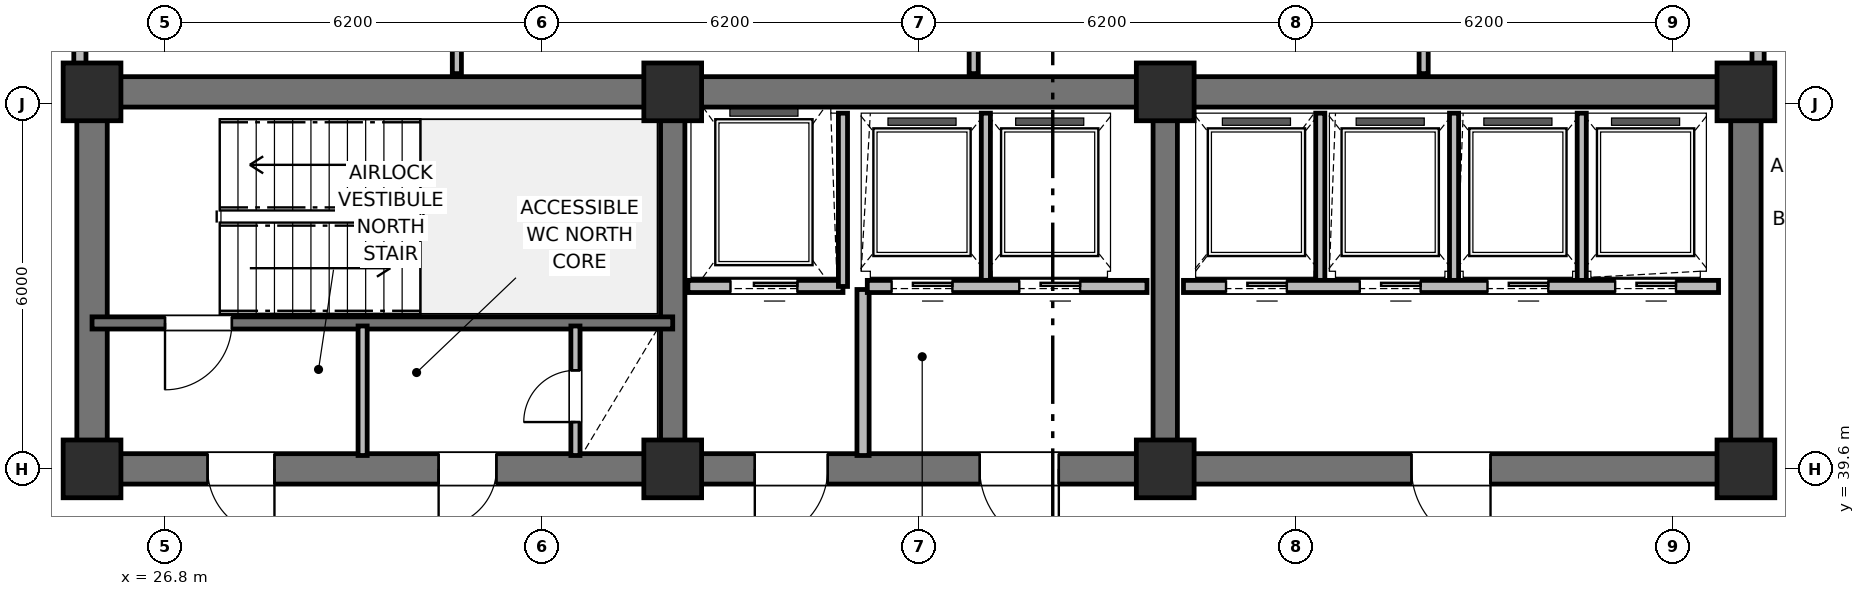
"""IFC4 building model, lengths in metres.
Left out: names, types, materials, properties, quantities, classifications, styles, units other than length and angle.
Written with IfcOpenShell. Run it as: python <this file> out.ifc"""

import sys

from ifc_helpers import new_model, si_unit, direction, frame, frame_2d, origin, origin_2d, place, context, subcontext, project, spatial, rectangle, extrude, element, fill, save


model = new_model("IFC4")
c1 = context("Model", 3, precision=1e-05, world=origin(), true_north=direction((0.0, 1.0)))
c2 = subcontext(c1, "Body", "Model", "MODEL_VIEW")
j1 = project(units=[si_unit("LENGTHUNIT", "METRE"), si_unit("PLANEANGLEUNIT", "RADIAN")], contexts=[c1])
p1 = place(None, origin())
s1 = spatial("IfcSite", under=j1, at=p1, CompositionType="ELEMENT")
p2 = place(p1, origin())
s2 = spatial("IfcBuilding", under=s1, at=p2, CompositionType="ELEMENT")
p3 = place(p2, frame((0.0, 0.0, 143.6)))
s3 = spatial("IfcBuildingStorey", under=s2, at=p3, CompositionType="ELEMENT", Elevation=143.6)
p4 = place(p3, frame((25.6, 45.8, 0.0), z_axis=(0.0, 0.0, 1.0), x_axis=(1.0, 0.0, 0.0)))
e1 = element("IfcWall", 1, at=p4, inside=s3, PredefinedType="SHEAR", context=c2, shape_type="SweptSolid", body=[
    extrude(rectangle(XDim=27.2, YDim=0.5, at=frame_2d((13.6, 0.0))), origin(), (0.0, 0.0, 1.0), 4.2),
])
for number, where, z_axis, x_axis in (
    (2, (25.6, 39.85, 0.0), (0.0, 0.0, 1.0), (0.0, 1.0, 0.0)),
    (3, (52.8, 39.85, 0.0), (0.0, 0.0, 1.0), (0.0, 1.0, 0.0)),
):
    element("IfcWall", number, at=place(p3, frame(where, z_axis=z_axis, x_axis=x_axis)), inside=s3, PredefinedType="SHEAR", context=c2, shape_type="SweptSolid", body=[
        extrude(rectangle(XDim=5.7, YDim=0.5, at=frame_2d((2.85, 0.0))), origin(), (0.0, 0.0, 1.0), 4.2),
    ])
p5 = place(p3, frame((52.8, 39.6, 0.0), z_axis=(0.0, 0.0, 1.0), x_axis=(-1.0, 0.0, 0.0)))
e4 = element("IfcWall", 4, at=p5, inside=s3, PredefinedType="SHEAR", context=c2, shape_type="SweptSolid", body=[
    extrude(rectangle(XDim=27.2, YDim=0.5, at=frame_2d((13.6, 0.0))), origin(), (0.0, 0.0, 1.0), 4.2),
])
p6 = place(p5, frame((24.2, 0.0, 0.0)))
e5 = element("IfcOpeningElement", 5, at=p6, cuts=e4, PredefinedType="OPENING", context=c2, shape_type="SweptSolid", body=[
    extrude(rectangle(XDim=1.1, YDim=2.15, at=frame_2d((0.55, 1.075))), frame((0.0, 0.26, 0.0), z_axis=(0.0, -1.0, 0.0), x_axis=(1.0, 0.0, 0.0)), (0.0, 0.0, 1.0), 0.52),
])
p7 = place(p5, frame((20.55, 0.0, 0.0)))
e6 = element("IfcOpeningElement", 6, at=p7, cuts=e4, PredefinedType="OPENING", context=c2, shape_type="SweptSolid", body=[
    extrude(rectangle(XDim=0.95, YDim=2.1, at=frame_2d((0.475, 1.05))), frame((0.0, 0.26, 0.0), z_axis=(0.0, -1.0, 0.0), x_axis=(1.0, 0.0, 0.0)), (0.0, 0.0, 1.0), 0.52),
])
p8 = place(p5, frame((15.1, 0.0, 0.0)))
e7 = element("IfcOpeningElement", 7, at=p8, cuts=e4, PredefinedType="OPENING", context=c2, shape_type="SweptSolid", body=[
    extrude(rectangle(XDim=1.2, YDim=2.15, at=frame_2d((0.6, 1.075))), frame((0.0, 0.26, 0.0), z_axis=(0.0, -1.0, 0.0), x_axis=(1.0, 0.0, 0.0)), (0.0, 0.0, 1.0), 0.52),
])
p9 = place(p5, frame((11.3, 0.0, 0.0)))
e8 = element("IfcOpeningElement", 8, at=p9, cuts=e4, PredefinedType="OPENING", context=c2, shape_type="SweptSolid", body=[
    extrude(rectangle(XDim=1.3, YDim=2.2, at=frame_2d((0.65, 1.1))), frame((0.0, 0.26, 0.0), z_axis=(0.0, -1.0, 0.0), x_axis=(1.0, 0.0, 0.0)), (0.0, 0.0, 1.0), 0.52),
])
p10 = place(p5, frame((4.2, 0.0, 0.0)))
e9 = element("IfcOpeningElement", 9, at=p10, cuts=e4, PredefinedType="OPENING", context=c2, shape_type="SweptSolid", body=[
    extrude(rectangle(XDim=1.3, YDim=2.2, at=frame_2d((0.65, 1.1))), frame((0.0, 0.26, 0.0), z_axis=(0.0, -1.0, 0.0), x_axis=(1.0, 0.0, 0.0)), (0.0, 0.0, 1.0), 0.52),
])
for number, where, z_axis, x_axis in (
    (10, (35.15, 39.85, 0.0), (0.0, 0.0, 1.0), (0.0, 1.0, 0.0)),
    (11, (43.25, 39.85, 0.0), (0.0, 0.0, 1.0), (0.0, 1.0, 0.0)),
):
    element("IfcWall", number, at=place(p3, frame(where, z_axis=z_axis, x_axis=x_axis)), inside=s3, PredefinedType="SHEAR", context=c2, shape_type="SweptSolid", body=[
        extrude(rectangle(XDim=5.7, YDim=0.4, at=frame_2d((2.85, 0.0))), origin(), (0.0, 0.0, 1.0), 4.2),
    ])
for number, where, z_axis, x_axis in (
    (12, (25.6, 39.6, 0.0), (0.0, 0.0, 1.0), (1.0, 0.0, 0.0)),
    (13, (25.6, 45.8, 0.0), (0.0, 0.0, 1.0), (1.0, 0.0, 0.0)),
    (14, (35.15, 39.6, 0.0), (0.0, 0.0, 1.0), (1.0, 0.0, 0.0)),
    (15, (35.15, 45.8, 0.0), (0.0, 0.0, 1.0), (1.0, 0.0, 0.0)),
    (16, (43.25, 39.6, 0.0), (0.0, 0.0, 1.0), (1.0, 0.0, 0.0)),
    (17, (43.25, 45.8, 0.0), (0.0, 0.0, 1.0), (1.0, 0.0, 0.0)),
    (18, (52.8, 39.6, 0.0), (0.0, 0.0, 1.0), (1.0, 0.0, 0.0)),
    (19, (52.8, 45.8, 0.0), (0.0, 0.0, 1.0), (1.0, 0.0, 0.0)),
):
    element("IfcColumn", number, at=place(p3, frame(where, z_axis=z_axis, x_axis=x_axis)), inside=s3, PredefinedType="COLUMN", context=c2, shape_type="SweptSolid", body=[
        extrude(rectangle(XDim=0.95, YDim=0.95, at=origin_2d()), origin(), (0.0, 0.0, 1.0), 4.2),
    ])
p11 = place(p3, frame((35.15, 42.0, 0.0), z_axis=(0.0, 0.0, 1.0), x_axis=(-1.0, 0.0, 0.0)))
e20 = element("IfcWall", 20, at=p11, inside=s3, PredefinedType="SHEAR", context=c2, shape_type="SweptSolid", body=[
    extrude(rectangle(XDim=9.55, YDim=0.2, at=frame_2d((4.775, 0.0))), origin(), (0.0, 0.0, 1.0), 4.2),
])
p12 = place(p11, frame((7.25, 0.0, 0.0)))
e21 = element("IfcOpeningElement", 21, at=p12, cuts=e20, PredefinedType="OPENING", context=c2, shape_type="SweptSolid", body=[
    extrude(rectangle(XDim=1.1, YDim=2.15, at=frame_2d((0.55, 1.075))), frame((0.0, 0.11, 0.0), z_axis=(0.0, -1.0, 0.0), x_axis=(1.0, 0.0, 0.0)), (0.0, 0.0, 1.0), 0.22),
])
p13 = place(p3, frame((33.55, 39.82, 0.0), z_axis=(0.0, 0.0, 1.0), x_axis=(0.0, 1.0, 0.0)))
e22 = element("IfcWall", 22, at=p13, inside=s3, PredefinedType="PARTITIONING", context=c2, shape_type="SweptSolid", body=[
    extrude(rectangle(XDim=2.13, YDim=0.15, at=frame_2d((1.065, 0.0))), origin(), (0.0, 0.0, 1.0), 3.05),
])
p14 = place(p13, frame((0.55, 0.0, 0.0)))
e23 = element("IfcOpeningElement", 23, at=p14, cuts=e22, PredefinedType="OPENING", context=c2, shape_type="SweptSolid", body=[
    extrude(rectangle(XDim=0.85, YDim=2.05, at=frame_2d((0.425, 1.025))), frame((0.0, 0.085, 0.0), z_axis=(0.0, -1.0, 0.0), x_axis=(1.0, 0.0, 0.0)), (0.0, 0.0, 1.0), 0.17),
])
p15 = place(p3, frame((30.05, 39.82, 0.0), z_axis=(0.0, 0.0, 1.0), x_axis=(0.0, 1.0, 0.0)))
e24 = element("IfcWall", 24, at=p15, inside=s3, PredefinedType="PARTITIONING", context=c2, shape_type="SweptSolid", body=[
    extrude(rectangle(XDim=2.13, YDim=0.15, at=frame_2d((1.065, 0.0))), origin(), (0.0, 0.0, 1.0), 3.05),
])
p16 = place(p3, frame((37.95, 42.6, 0.0), z_axis=(0.0, 0.0, 1.0), x_axis=(-1.0, 0.0, 0.0)))
e25 = element("IfcWall", 25, at=p16, inside=s3, PredefinedType="PARTITIONING", context=c2, shape_type="SweptSolid", body=[
    extrude(rectangle(XDim=2.55, YDim=0.2, at=frame_2d((1.275, 0.0))), origin(), (0.0, 0.0, 1.0), 2.82),
])
p17 = place(p16, frame((0.75, 0.0, 0.0)))
e26 = element("IfcOpeningElement", 26, at=p17, cuts=e25, PredefinedType="OPENING", context=c2, shape_type="SweptSolid", body=[
    extrude(rectangle(XDim=1.1, YDim=2.15, at=frame_2d((0.55, 1.075))), frame((0.0, 0.11, 0.0), z_axis=(0.0, -1.0, 0.0), x_axis=(1.0, 0.0, 0.0)), (0.0, 0.0, 1.0), 0.22),
])
p18 = place(p3, frame((37.95, 42.6, 0.0), z_axis=(0.0, 0.0, 1.0), x_axis=(0.0, 1.0, 0.0)))
e27 = element("IfcWall", 27, at=p18, inside=s3, PredefinedType="PARTITIONING", context=c2, shape_type="SweptSolid", body=[
    extrude(rectangle(XDim=2.85, YDim=0.15, at=frame_2d((1.425, 0.0))), origin(), (0.0, 0.0, 1.0), 3.05),
])
p19 = place(p3, frame((38.28, 39.82, 0.0), z_axis=(0.0, 0.0, 1.0), x_axis=(0.0, 1.0, 0.0)))
e28 = element("IfcWall", 28, at=p19, inside=s3, PredefinedType="PARTITIONING", context=c2, shape_type="SweptSolid", body=[
    extrude(rectangle(XDim=2.73, YDim=0.2, at=frame_2d((1.365, 0.0))), origin(), (0.0, 0.0, 1.0), 3.05),
])
p20 = place(p3, frame((40.3, 42.65, 0.0), z_axis=(0.0, 0.0, 1.0), x_axis=(0.0, 1.0, 0.0)))
e29 = element("IfcWall", 29, at=p20, inside=s3, PredefinedType="PARTITIONING", context=c2, shape_type="SweptSolid", body=[
    extrude(rectangle(XDim=2.8, YDim=0.15, at=frame_2d((1.4, 0.0))), origin(), (0.0, 0.0, 1.0), 3.05),
])
p21 = place(p3, frame((42.95, 42.6, 0.0), z_axis=(0.0, 0.0, 1.0), x_axis=(-1.0, 0.0, 0.0)))
e30 = element("IfcWall", 30, at=p21, inside=s3, PredefinedType="PARTITIONING", context=c2, shape_type="SweptSolid", body=[
    extrude(rectangle(XDim=4.6, YDim=0.2, at=frame_2d((2.3, 0.0))), origin(), (0.0, 0.0, 1.0), 2.82),
])
p22 = place(p21, frame((3.2, 0.0, 0.0)))
e31 = element("IfcOpeningElement", 31, at=p22, cuts=e30, PredefinedType="OPENING", context=c2, shape_type="SweptSolid", body=[
    extrude(rectangle(XDim=1.0, YDim=2.15, at=frame_2d((0.5, 1.075))), frame((0.0, 0.11, 0.0), z_axis=(0.0, -1.0, 0.0), x_axis=(1.0, 0.0, 0.0)), (0.0, 0.0, 1.0), 0.22),
])
p23 = place(p21, frame((1.1, 0.0, 0.0)))
e32 = element("IfcOpeningElement", 32, at=p23, cuts=e30, PredefinedType="OPENING", context=c2, shape_type="SweptSolid", body=[
    extrude(rectangle(XDim=1.0, YDim=2.15, at=frame_2d((0.5, 1.075))), frame((0.0, 0.11, 0.0), z_axis=(0.0, -1.0, 0.0), x_axis=(1.0, 0.0, 0.0)), (0.0, 0.0, 1.0), 0.22),
])
for number, where, z_axis, x_axis in (
    (33, (45.8, 42.65, 0.0), (0.0, 0.0, 1.0), (0.0, 1.0, 0.0)),
    (34, (48.0, 42.65, 0.0), (0.0, 0.0, 1.0), (0.0, 1.0, 0.0)),
    (35, (50.1, 42.65, 0.0), (0.0, 0.0, 1.0), (0.0, 1.0, 0.0)),
):
    element("IfcWall", number, at=place(p3, frame(where, z_axis=z_axis, x_axis=x_axis)), inside=s3, PredefinedType="PARTITIONING", context=c2, shape_type="SweptSolid", body=[
        extrude(rectangle(XDim=2.8, YDim=0.15, at=frame_2d((1.4, 0.0))), origin(), (0.0, 0.0, 1.0), 3.05),
    ])
p24 = place(p3, frame((52.35, 42.6, 0.0), z_axis=(0.0, 0.0, 1.0), x_axis=(-1.0, 0.0, 0.0)))
e36 = element("IfcWall", 36, at=p24, inside=s3, PredefinedType="PARTITIONING", context=c2, shape_type="SweptSolid", body=[
    extrude(rectangle(XDim=8.8, YDim=0.2, at=frame_2d((4.4, 0.0))), origin(), (0.0, 0.0, 1.0), 3.05),
])
p25 = place(p24, frame((7.1, 0.0, 0.0)))
e37 = element("IfcOpeningElement", 37, at=p25, cuts=e36, PredefinedType="OPENING", context=c2, shape_type="SweptSolid", body=[
    extrude(rectangle(XDim=1.0, YDim=2.15, at=frame_2d((0.5, 1.075))), frame((0.0, 0.11, 0.0), z_axis=(0.0, -1.0, 0.0), x_axis=(1.0, 0.0, 0.0)), (0.0, 0.0, 1.0), 0.22),
])
p26 = place(p24, frame((4.9, 0.0, 0.0)))
e38 = element("IfcOpeningElement", 38, at=p26, cuts=e36, PredefinedType="OPENING", context=c2, shape_type="SweptSolid", body=[
    extrude(rectangle(XDim=1.0, YDim=2.15, at=frame_2d((0.5, 1.075))), frame((0.0, 0.11, 0.0), z_axis=(0.0, -1.0, 0.0), x_axis=(1.0, 0.0, 0.0)), (0.0, 0.0, 1.0), 0.22),
])
p27 = place(p24, frame((2.8, 0.0, 0.0)))
e39 = element("IfcOpeningElement", 39, at=p27, cuts=e36, PredefinedType="OPENING", context=c2, shape_type="SweptSolid", body=[
    extrude(rectangle(XDim=1.0, YDim=2.15, at=frame_2d((0.5, 1.075))), frame((0.0, 0.11, 0.0), z_axis=(0.0, -1.0, 0.0), x_axis=(1.0, 0.0, 0.0)), (0.0, 0.0, 1.0), 0.22),
])
p28 = place(p24, frame((0.7, 0.0, 0.0)))
e40 = element("IfcOpeningElement", 40, at=p28, cuts=e36, PredefinedType="OPENING", context=c2, shape_type="SweptSolid", body=[
    extrude(rectangle(XDim=1.0, YDim=2.15, at=frame_2d((0.5, 1.075))), frame((0.0, 0.11, 0.0), z_axis=(0.0, -1.0, 0.0), x_axis=(1.0, 0.0, 0.0)), (0.0, 0.0, 1.0), 0.22),
])
p29 = place(p3, frame((31.6, 46.1, 0.0), z_axis=(0.0, 0.0, 1.0), x_axis=(0.0, 1.0, 0.0)))
e41 = element("IfcWall", 41, at=p29, inside=s3, PredefinedType="PARTITIONING", context=c2, shape_type="SweptSolid", body=[
    extrude(rectangle(XDim=3.43, YDim=0.15, at=frame_2d((1.715, 0.0))), origin(), (0.0, 0.0, 1.0), 3.05),
])
p30 = place(p29, frame((0.85, 0.0, 0.0)))
e42 = element("IfcOpeningElement", 42, at=p30, cuts=e41, PredefinedType="OPENING", context=c2, shape_type="SweptSolid", body=[
    extrude(rectangle(XDim=0.9, YDim=2.1, at=frame_2d((0.45, 1.05))), frame((0.0, 0.085, 0.0), z_axis=(0.0, -1.0, 0.0), x_axis=(1.0, 0.0, 0.0)), (0.0, 0.0, 1.0), 0.17),
])
p31 = place(p3, frame((40.1, 46.1, 0.0), z_axis=(0.0, 0.0, 1.0), x_axis=(0.0, 1.0, 0.0)))
e43 = element("IfcWall", 43, at=p31, inside=s3, PredefinedType="PARTITIONING", context=c2, shape_type="SweptSolid", body=[
    extrude(rectangle(XDim=3.43, YDim=0.15, at=frame_2d((1.715, 0.0))), origin(), (0.0, 0.0, 1.0), 3.05),
])
p32 = place(p3, frame((47.5, 46.1, 0.0), z_axis=(0.0, 0.0, 1.0), x_axis=(0.0, 1.0, 0.0)))
e44 = element("IfcWall", 44, at=p32, inside=s3, PredefinedType="PARTITIONING", context=c2, shape_type="SweptSolid", body=[
    extrude(rectangle(XDim=3.43, YDim=0.15, at=frame_2d((1.715, 0.0))), origin(), (0.0, 0.0, 1.0), 3.05),
])
p33 = place(p32, frame((0.85, 0.0, 0.0)))
e45 = element("IfcOpeningElement", 45, at=p33, cuts=e44, PredefinedType="OPENING", context=c2, shape_type="SweptSolid", body=[
    extrude(rectangle(XDim=0.9, YDim=2.1, at=frame_2d((0.45, 1.05))), frame((0.0, 0.085, 0.0), z_axis=(0.0, -1.0, 0.0), x_axis=(1.0, 0.0, 0.0)), (0.0, 0.0, 1.0), 0.17),
])
p34 = place(p3, frame((25.4, 46.1, 0.0), z_axis=(0.0, 0.0, 1.0), x_axis=(0.0, 1.0, 0.0)))
e46 = element("IfcWall", 46, at=p34, inside=s3, PredefinedType="PARTITIONING", context=c2, shape_type="SweptSolid", body=[
    extrude(rectangle(XDim=2.78, YDim=0.2, at=frame_2d((1.39, 0.0))), origin(), (0.0, 0.0, 1.0), 3.05),
])
p35 = place(p34, frame((0.65, 0.0, 0.0)))
e47 = element("IfcOpeningElement", 47, at=p35, cuts=e46, PredefinedType="OPENING", context=c2, shape_type="SweptSolid", body=[
    extrude(rectangle(XDim=0.9, YDim=2.1, at=frame_2d((0.45, 1.05))), frame((0.0, 0.11, 0.0), z_axis=(0.0, -1.0, 0.0), x_axis=(1.0, 0.0, 0.0)), (0.0, 0.0, 1.0), 0.22),
])
p36 = place(p3, frame((53.0, 46.1, 0.0), z_axis=(0.0, 0.0, 1.0), x_axis=(0.0, 1.0, 0.0)))
e48 = element("IfcWall", 48, at=p36, inside=s3, PredefinedType="PARTITIONING", context=c2, shape_type="SweptSolid", body=[
    extrude(rectangle(XDim=2.78, YDim=0.2, at=frame_2d((1.39, 0.0))), origin(), (0.0, 0.0, 1.0), 3.05),
])
p37 = place(p36, frame((0.65, 0.0, 0.0)))
e49 = element("IfcOpeningElement", 49, at=p37, cuts=e48, PredefinedType="OPENING", context=c2, shape_type="SweptSolid", body=[
    extrude(rectangle(XDim=0.9, YDim=2.1, at=frame_2d((0.45, 1.05))), frame((0.0, 0.11, 0.0), z_axis=(0.0, -1.0, 0.0), x_axis=(1.0, 0.0, 0.0)), (0.0, 0.0, 1.0), 0.22),
])
p38 = place(p12, origin())
e50 = element("IfcDoor", 50, at=p38, inside=s3, OperationType="SINGLE_SWING_RIGHT", PredefinedType="DOOR", context=c2, shape_type="SweptSolid", body=[
    extrude(rectangle(XDim=1.1, YDim=2.15, at=frame_2d((0.55, 1.075))), frame((0.0, 0.025, 0.0), z_axis=(0.0, -1.0, 0.0), x_axis=(1.0, 0.0, 0.0)), (0.0, 0.0, 1.0), 0.05),
])
fill(e21, e50)
p39 = place(p14, origin())
e51 = element("IfcDoor", 51, at=p39, inside=s3, OperationType="SINGLE_SWING_LEFT", PredefinedType="TRAPDOOR", context=c2, shape_type="SweptSolid", body=[
    extrude(rectangle(XDim=0.85, YDim=2.05, at=frame_2d((0.425, 1.025))), frame((0.0, 0.025, 0.0), z_axis=(0.0, -1.0, 0.0), x_axis=(1.0, 0.0, 0.0)), (0.0, 0.0, 1.0), 0.05),
])
fill(e23, e51)
p40 = place(p17, origin())
e52 = element("IfcDoor", 52, at=p40, inside=s3, OperationType="SLIDING_TO_LEFT", PredefinedType="DOOR", context=c2, shape_type="SweptSolid", body=[
    extrude(rectangle(XDim=1.1, YDim=2.15, at=frame_2d((0.55, 1.075))), frame((0.0, 0.025, 0.0), z_axis=(0.0, -1.0, 0.0), x_axis=(1.0, 0.0, 0.0)), (0.0, 0.0, 1.0), 0.05),
])
fill(e26, e52)
p41 = place(p22, origin())
e53 = element("IfcDoor", 53, at=p41, inside=s3, OperationType="SLIDING_TO_LEFT", PredefinedType="DOOR", context=c2, shape_type="SweptSolid", body=[
    extrude(rectangle(XDim=1.0, YDim=2.15, at=frame_2d((0.5, 1.075))), frame((0.0, 0.025, 0.0), z_axis=(0.0, -1.0, 0.0), x_axis=(1.0, 0.0, 0.0)), (0.0, 0.0, 1.0), 0.05),
])
fill(e31, e53)
p42 = place(p23, origin())
e54 = element("IfcDoor", 54, at=p42, inside=s3, OperationType="SLIDING_TO_LEFT", PredefinedType="DOOR", context=c2, shape_type="SweptSolid", body=[
    extrude(rectangle(XDim=1.0, YDim=2.15, at=frame_2d((0.5, 1.075))), frame((0.0, 0.025, 0.0), z_axis=(0.0, -1.0, 0.0), x_axis=(1.0, 0.0, 0.0)), (0.0, 0.0, 1.0), 0.05),
])
fill(e32, e54)
p43 = place(p25, origin())
e55 = element("IfcDoor", 55, at=p43, inside=s3, OperationType="SLIDING_TO_LEFT", PredefinedType="DOOR", context=c2, shape_type="SweptSolid", body=[
    extrude(rectangle(XDim=1.0, YDim=2.15, at=frame_2d((0.5, 1.075))), frame((0.0, 0.025, 0.0), z_axis=(0.0, -1.0, 0.0), x_axis=(1.0, 0.0, 0.0)), (0.0, 0.0, 1.0), 0.05),
])
fill(e37, e55)
p44 = place(p26, origin())
e56 = element("IfcDoor", 56, at=p44, inside=s3, OperationType="SLIDING_TO_LEFT", PredefinedType="DOOR", context=c2, shape_type="SweptSolid", body=[
    extrude(rectangle(XDim=1.0, YDim=2.15, at=frame_2d((0.5, 1.075))), frame((0.0, 0.025, 0.0), z_axis=(0.0, -1.0, 0.0), x_axis=(1.0, 0.0, 0.0)), (0.0, 0.0, 1.0), 0.05),
])
fill(e38, e56)
p45 = place(p27, origin())
e57 = element("IfcDoor", 57, at=p45, inside=s3, OperationType="SLIDING_TO_LEFT", PredefinedType="DOOR", context=c2, shape_type="SweptSolid", body=[
    extrude(rectangle(XDim=1.0, YDim=2.15, at=frame_2d((0.5, 1.075))), frame((0.0, 0.025, 0.0), z_axis=(0.0, -1.0, 0.0), x_axis=(1.0, 0.0, 0.0)), (0.0, 0.0, 1.0), 0.05),
])
fill(e39, e57)
p46 = place(p28, origin())
e58 = element("IfcDoor", 58, at=p46, inside=s3, OperationType="SLIDING_TO_LEFT", PredefinedType="DOOR", context=c2, shape_type="SweptSolid", body=[
    extrude(rectangle(XDim=1.0, YDim=2.15, at=frame_2d((0.5, 1.075))), frame((0.0, 0.025, 0.0), z_axis=(0.0, -1.0, 0.0), x_axis=(1.0, 0.0, 0.0)), (0.0, 0.0, 1.0), 0.05),
])
fill(e40, e58)
p47 = place(p6, origin())
e59 = element("IfcDoor", 59, at=p47, inside=s3, OperationType="SINGLE_SWING_LEFT", PredefinedType="DOOR", context=c2, shape_type="SweptSolid", body=[
    extrude(rectangle(XDim=1.1, YDim=2.15, at=frame_2d((0.55, 1.075))), frame((0.0, 0.025, 0.0), z_axis=(0.0, -1.0, 0.0), x_axis=(1.0, 0.0, 0.0)), (0.0, 0.0, 1.0), 0.05),
])
fill(e5, e59)
p48 = place(p7, origin())
e60 = element("IfcDoor", 60, at=p48, inside=s3, OperationType="SINGLE_SWING_RIGHT", PredefinedType="DOOR", context=c2, shape_type="SweptSolid", body=[
    extrude(rectangle(XDim=0.95, YDim=2.1, at=frame_2d((0.475, 1.05))), frame((0.0, 0.025, 0.0), z_axis=(0.0, -1.0, 0.0), x_axis=(1.0, 0.0, 0.0)), (0.0, 0.0, 1.0), 0.05),
])
fill(e6, e60)
p49 = place(p8, origin())
e61 = element("IfcDoor", 61, at=p49, inside=s3, OperationType="SINGLE_SWING_RIGHT", PredefinedType="DOOR", context=c2, shape_type="SweptSolid", body=[
    extrude(rectangle(XDim=1.2, YDim=2.15, at=frame_2d((0.6, 1.075))), frame((0.0, 0.025, 0.0), z_axis=(0.0, -1.0, 0.0), x_axis=(1.0, 0.0, 0.0)), (0.0, 0.0, 1.0), 0.05),
])
fill(e7, e61)
p50 = place(p9, origin())
e62 = element("IfcDoor", 62, at=p50, inside=s3, OperationType="SINGLE_SWING_LEFT", PredefinedType="DOOR", context=c2, shape_type="SweptSolid", body=[
    extrude(rectangle(XDim=1.3, YDim=2.2, at=frame_2d((0.65, 1.1))), frame((0.0, 0.025, 0.0), z_axis=(0.0, -1.0, 0.0), x_axis=(1.0, 0.0, 0.0)), (0.0, 0.0, 1.0), 0.05),
])
fill(e8, e62)
p51 = place(p10, origin())
e63 = element("IfcDoor", 63, at=p51, inside=s3, OperationType="SINGLE_SWING_LEFT", PredefinedType="DOOR", context=c2, shape_type="SweptSolid", body=[
    extrude(rectangle(XDim=1.3, YDim=2.2, at=frame_2d((0.65, 1.1))), frame((0.0, 0.025, 0.0), z_axis=(0.0, -1.0, 0.0), x_axis=(1.0, 0.0, 0.0)), (0.0, 0.0, 1.0), 0.05),
])
fill(e9, e63)
save(model, sys.argv[1])
